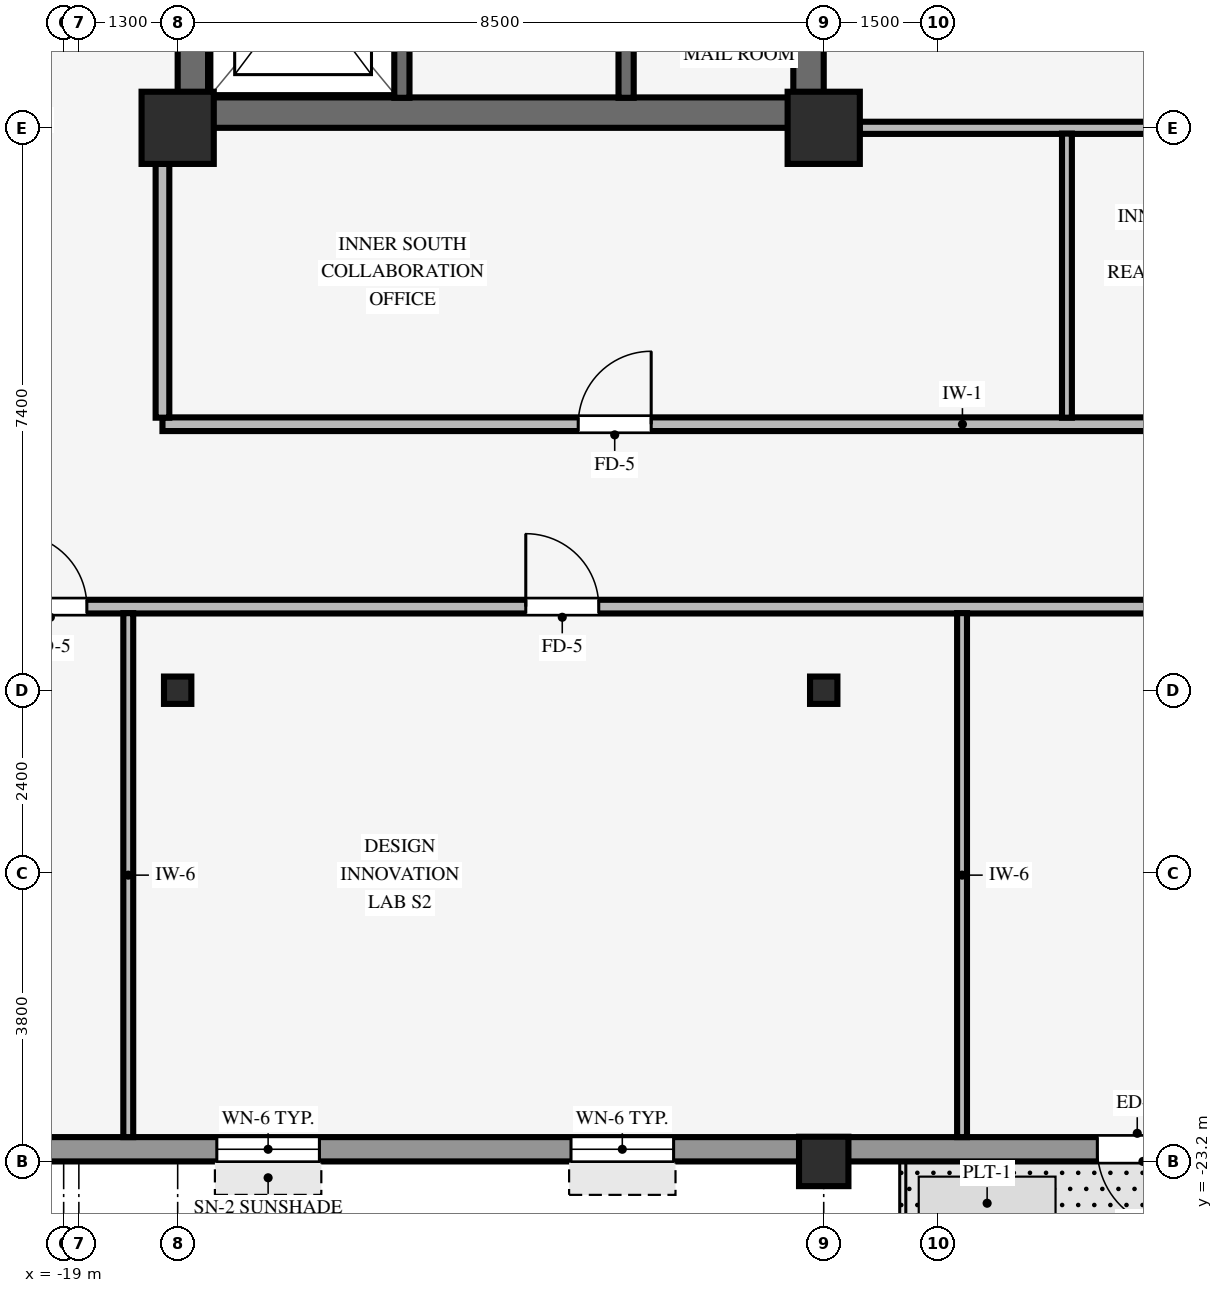
"""IFC4 building model, lengths in metres.
Left out: names, types, materials, properties, quantities, classifications, styles, units other than length and angle.
Written with IfcOpenShell. Run it as: python <this file> out.ifc"""

import sys

from ifc_helpers import new_model, si_unit, direction, frame, frame_2d, origin, origin_2d, place, context, subcontext, project, spatial, rectangle, hollow_rectangle, i_section, extrude, source, transform, mapped, element, fill, save


model = new_model("IFC4")
c1 = context("Model", 3, precision=1e-05, world=origin(), true_north=direction((0.0, 1.0)))
c2 = subcontext(c1, "Body", "Model", "MODEL_VIEW")
j1 = project(units=[si_unit("LENGTHUNIT", "METRE"), si_unit("PLANEANGLEUNIT", "RADIAN")], contexts=[c1])
p1 = place(None, origin())
s1 = spatial("IfcSite", under=j1, at=p1, CompositionType="ELEMENT")
p2 = place(p1, origin())
s2 = spatial("IfcBuilding", under=s1, at=p2, CompositionType="ELEMENT")
p3 = place(p2, frame((0.0, 0.0, 149.4)))
s3 = spatial("IfcBuildingStorey", under=s2, at=p3, CompositionType="ELEMENT", Elevation=149.4)
p4 = place(p3, frame((-17.5, -9.4, 0.0), z_axis=(0.0, 0.0, 1.0), x_axis=(1.0, 0.0, 0.0)))
e1 = element("IfcWall", 1, at=p4, inside=s3, PredefinedType="SHEAR", context=c2, shape_type="SweptSolid", body=[
    extrude(rectangle(XDim=8.5, YDim=0.4, at=frame_2d((4.25, 0.0))), origin(), (0.0, 0.0, 1.0), 3.37),
])
p5 = place(p3, frame((-17.3, -9.205, 0.0), z_axis=(0.0, 0.0, 1.0), x_axis=(0.0, 1.0, 0.0)))
e2 = element("IfcWall", 2, at=p5, inside=s3, PredefinedType="SHEAR", context=c2, shape_type="SweptSolid", body=[
    extrude(rectangle(XDim=18.41, YDim=0.4, at=frame_2d((9.205, 0.0))), origin(), (0.0, 0.0, 1.0), 3.37),
])
p6 = place(p3, frame((-9.2, -9.205, 0.0), z_axis=(0.0, 0.0, 1.0), x_axis=(0.0, 1.0, 0.0)))
e3 = element("IfcWall", 3, at=p6, inside=s3, PredefinedType="SHEAR", context=c2, shape_type="SweptSolid", body=[
    extrude(rectangle(XDim=18.41, YDim=0.4, at=frame_2d((9.205, 0.0))), origin(), (0.0, 0.0, 1.0), 3.37),
])
p7 = place(p6, frame((8.605, 0.0, 0.0)))
e4 = element("IfcOpeningElement", 4, at=p7, cuts=e3, PredefinedType="OPENING", context=c2, shape_type="SweptSolid", body=[
    extrude(rectangle(XDim=1.2, YDim=2.15, at=frame_2d((0.6, 1.075))), frame((0.0, 0.21, 0.0), z_axis=(0.0, -1.0, 0.0), x_axis=(1.0, 0.0, 0.0)), (0.0, 0.0, 1.0), 0.42),
])
for number, where, z_axis, x_axis in (
    (5, (-17.5, -9.6, 0.0), (0.0, 0.0, 1.0), (1.0, 0.0, 0.0)),
    (6, (-9.0, -9.6, 0.0), (0.0, 0.0, 1.0), (1.0, 0.0, 0.0)),
):
    element("IfcColumn", number, at=place(p3, frame(where, z_axis=z_axis, x_axis=x_axis)), inside=s3, PredefinedType="COLUMN", context=c2, shape_type="SweptSolid", body=[
        extrude(rectangle(XDim=0.95, YDim=0.95, at=origin_2d()), origin(), (0.0, 0.0, 1.0), 3.37),
    ])
p8 = place(p3, frame((-9.0, -23.2, 0.0), z_axis=(0.0, 0.0, 1.0), x_axis=(1.0, 0.0, 0.0)))
e7 = element("IfcColumn", 7, at=p8, inside=s3, PredefinedType="COLUMN", context=c2, shape_type="SweptSolid", body=[
    extrude(hollow_rectangle(XDim=0.65, YDim=0.65, WallThickness=0.04, InnerFilletRadius=0.04, OuterFilletRadius=0.08, at=origin_2d()), origin(), (0.0, 0.0, 1.0), 3.37),
])
for number, where, z_axis, x_axis in (
    (8, (-17.5, -17.0, 0.0), (0.0, 0.0, 1.0), (1.0, 0.0, 0.0)),
    (9, (-9.0, -17.0, 0.0), (0.0, 0.0, 1.0), (1.0, 0.0, 0.0)),
):
    element("IfcColumn", number, at=place(p3, frame(where, z_axis=z_axis, x_axis=x_axis)), inside=s3, PredefinedType="COLUMN", context=c2, shape_type="SweptSolid", body=[
        extrude(i_section(OverallWidth=0.36, OverallDepth=0.36, WebThickness=0.021, FlangeThickness=0.021, FilletRadius=0.018, at=origin_2d()), origin(), (0.0, 0.0, 1.0), 3.37),
    ])
p9 = place(p3, frame((-24.3, -23.04, 0.0), z_axis=(0.0, 0.0, 1.0), x_axis=(1.0, 0.0, 0.0)))
e10 = element("IfcWall", 10, at=p9, inside=s3, PredefinedType="STANDARD", context=c2, shape_type="SweptSolid", body=[
    extrude(rectangle(XDim=48.6, YDim=0.32, at=frame_2d((24.3, 0.0))), origin(), (0.0, 0.0, 1.0), 2.705),
])
p10 = place(p9, frame((19.95, 0.0, 0.0), z_axis=(0.0, 0.0, 1.0), x_axis=(-1.0, 0.0, 0.0)))
e11 = element("IfcOpeningElement", 11, at=p10, cuts=e10, PredefinedType="OPENING", context=c2, shape_type="SweptSolid", body=[
    extrude(rectangle(XDim=1.05, YDim=2.1, at=frame_2d((0.525, 1.05))), frame((0.0, 0.17, 0.0), z_axis=(0.0, -1.0, 0.0), x_axis=(1.0, 0.0, 0.0)), (0.0, 0.0, 1.0), 0.34),
])
p11 = place(p9, frame((2.655, 0.0, 0.8)))
e12 = element("IfcOpeningElement", 12, at=p11, cuts=e10, PredefinedType="OPENING", context=c2, shape_type="SweptSolid", body=[
    extrude(rectangle(XDim=1.35, YDim=1.56, at=frame_2d((0.675, 0.78))), frame((0.0, 0.17, 0.0), z_axis=(0.0, -1.0, 0.0), x_axis=(1.0, 0.0, 0.0)), (0.0, 0.0, 1.0), 0.34),
])
p12 = place(p9, frame((7.315, 0.0, 0.8)))
e13 = element("IfcOpeningElement", 13, at=p12, cuts=e10, PredefinedType="OPENING", context=c2, shape_type="SweptSolid", body=[
    extrude(rectangle(XDim=1.35, YDim=1.56, at=frame_2d((0.675, 0.78))), frame((0.0, 0.17, 0.0), z_axis=(0.0, -1.0, 0.0), x_axis=(1.0, 0.0, 0.0)), (0.0, 0.0, 1.0), 0.34),
])
p13 = place(p9, frame((11.975, 0.0, 0.8)))
e14 = element("IfcOpeningElement", 14, at=p13, cuts=e10, PredefinedType="OPENING", context=c2, shape_type="SweptSolid", body=[
    extrude(rectangle(XDim=1.35, YDim=1.56, at=frame_2d((0.675, 0.78))), frame((0.0, 0.17, 0.0), z_axis=(0.0, -1.0, 0.0), x_axis=(1.0, 0.0, 0.0)), (0.0, 0.0, 1.0), 0.34),
])
p14 = place(p9, frame((21.295, 0.0, 0.8)))
e15 = element("IfcOpeningElement", 15, at=p14, cuts=e10, PredefinedType="OPENING", context=c2, shape_type="SweptSolid", body=[
    extrude(rectangle(XDim=1.35, YDim=1.56, at=frame_2d((0.675, 0.78))), frame((0.0, 0.17, 0.0), z_axis=(0.0, -1.0, 0.0), x_axis=(1.0, 0.0, 0.0)), (0.0, 0.0, 1.0), 0.34),
])
p15 = place(p9, frame((25.955, 0.0, 0.8)))
e16 = element("IfcOpeningElement", 16, at=p15, cuts=e10, PredefinedType="OPENING", context=c2, shape_type="SweptSolid", body=[
    extrude(rectangle(XDim=1.35, YDim=1.56, at=frame_2d((0.675, 0.78))), frame((0.0, 0.17, 0.0), z_axis=(0.0, -1.0, 0.0), x_axis=(1.0, 0.0, 0.0)), (0.0, 0.0, 1.0), 0.34),
])
p16 = place(p9, frame((31.065, 0.0, 0.8)))
e17 = element("IfcOpeningElement", 17, at=p16, cuts=e10, PredefinedType="OPENING", context=c2, shape_type="SweptSolid", body=[
    extrude(rectangle(XDim=1.35, YDim=1.56, at=frame_2d((0.675, 0.78))), frame((0.0, 0.17, 0.0), z_axis=(0.0, -1.0, 0.0), x_axis=(1.0, 0.0, 0.0)), (0.0, 0.0, 1.0), 0.34),
])
p17 = place(p9, frame((35.275, 0.0, 0.8)))
e18 = element("IfcOpeningElement", 18, at=p17, cuts=e10, PredefinedType="OPENING", context=c2, shape_type="SweptSolid", body=[
    extrude(rectangle(XDim=1.35, YDim=1.56, at=frame_2d((0.675, 0.78))), frame((0.0, 0.17, 0.0), z_axis=(0.0, -1.0, 0.0), x_axis=(1.0, 0.0, 0.0)), (0.0, 0.0, 1.0), 0.34),
])
p18 = place(p9, frame((39.935, 0.0, 0.8)))
e19 = element("IfcOpeningElement", 19, at=p18, cuts=e10, PredefinedType="OPENING", context=c2, shape_type="SweptSolid", body=[
    extrude(rectangle(XDim=1.35, YDim=1.56, at=frame_2d((0.675, 0.78))), frame((0.0, 0.17, 0.0), z_axis=(0.0, -1.0, 0.0), x_axis=(1.0, 0.0, 0.0)), (0.0, 0.0, 1.0), 0.34),
])
p19 = place(p9, frame((44.595, 0.0, 0.8)))
e20 = element("IfcOpeningElement", 20, at=p19, cuts=e10, PredefinedType="OPENING", context=c2, shape_type="SweptSolid", body=[
    extrude(rectangle(XDim=1.35, YDim=1.56, at=frame_2d((0.675, 0.78))), frame((0.0, 0.17, 0.0), z_axis=(0.0, -1.0, 0.0), x_axis=(1.0, 0.0, 0.0)), (0.0, 0.0, 1.0), 0.34),
])
p20 = place(p3, frame((-14.55, -9.205, 0.0), z_axis=(0.0, 0.0, 1.0), x_axis=(0.0, 1.0, 0.0)))
e21 = element("IfcWall", 21, at=p20, inside=s3, PredefinedType="SHEAR", context=c2, shape_type="SweptSolid", body=[
    extrude(rectangle(XDim=3.01, YDim=0.2, at=frame_2d((1.505, 0.0))), origin(), (0.0, 0.0, 1.0), 3.37),
])
p21 = place(p20, frame((0.93, 0.0, 0.0)))
e22 = element("IfcOpeningElement", 22, at=p21, cuts=e21, PredefinedType="OPENING", context=c2, shape_type="SweptSolid", body=[
    extrude(rectangle(XDim=1.15, YDim=2.15, at=frame_2d((0.575, 1.075))), frame((0.0, 0.11, 0.0), z_axis=(0.0, -1.0, 0.0), x_axis=(1.0, 0.0, 0.0)), (0.0, 0.0, 1.0), 0.22),
])
p22 = place(p3, frame((-11.6, -9.205, 0.0), z_axis=(0.0, 0.0, 1.0), x_axis=(0.0, 1.0, 0.0)))
e23 = element("IfcWall", 23, at=p22, inside=s3, PredefinedType="SHEAR", context=c2, shape_type="SweptSolid", body=[
    extrude(rectangle(XDim=7.975, YDim=0.2, at=frame_2d((3.988, 0.0))), origin(), (0.0, 0.0, 1.0), 3.37),
])
p23 = place(p22, frame((1.265, 0.0, 0.0)))
e24 = element("IfcOpeningElement", 24, at=p23, cuts=e23, PredefinedType="OPENING", context=c2, shape_type="SweptSolid", body=[
    extrude(rectangle(XDim=0.88, YDim=2.1, at=frame_2d((0.44, 1.05))), frame((0.0, 0.11, 0.0), z_axis=(0.0, -1.0, 0.0), x_axis=(1.0, 0.0, 0.0)), (0.0, 0.0, 1.0), 0.22),
])
p24 = place(p22, frame((5.565, 0.0, 0.0)))
e25 = element("IfcOpeningElement", 25, at=p24, cuts=e23, PredefinedType="OPENING", context=c2, shape_type="SweptSolid", body=[
    extrude(rectangle(XDim=0.88, YDim=2.1, at=frame_2d((0.44, 1.05))), frame((0.0, 0.11, 0.0), z_axis=(0.0, -1.0, 0.0), x_axis=(1.0, 0.0, 0.0)), (0.0, 0.0, 1.0), 0.22),
])
p25 = place(p3, frame((-26.08, -15.9, 0.0), z_axis=(0.0, 0.0, 1.0), x_axis=(1.0, 0.0, 0.0)))
e26 = element("IfcWall", 26, at=p25, inside=s3, PredefinedType="PARTITIONING", context=c2, shape_type="SweptSolid", body=[
    extrude(rectangle(XDim=52.16, YDim=0.18, at=frame_2d((26.08, 0.0))), origin(), (0.0, 0.0, 1.0), 3.36),
])
p26 = place(p25, frame((24.5, 0.0, 0.0)))
e27 = element("IfcOpeningElement", 27, at=p26, cuts=e26, PredefinedType="OPENING", context=c2, shape_type="SweptSolid", body=[
    extrude(rectangle(XDim=0.96, YDim=2.1, at=frame_2d((0.48, 1.05))), frame((0.0, 0.1, 0.0), z_axis=(0.0, -1.0, 0.0), x_axis=(1.0, 0.0, 0.0)), (0.0, 0.0, 1.0), 0.2),
])
p27 = place(p25, frame((40.5, 0.0, 0.0)))
e28 = element("IfcOpeningElement", 28, at=p27, cuts=e26, PredefinedType="OPENING", context=c2, shape_type="SweptSolid", body=[
    extrude(rectangle(XDim=0.96, YDim=2.1, at=frame_2d((0.48, 1.05))), frame((0.0, 0.1, 0.0), z_axis=(0.0, -1.0, 0.0), x_axis=(1.0, 0.0, 0.0)), (0.0, 0.0, 1.0), 0.2),
])
p28 = place(p25, frame((13.16, 0.0, 0.0)))
e29 = element("IfcOpeningElement", 29, at=p28, cuts=e26, PredefinedType="OPENING", context=c2, shape_type="SweptSolid", body=[
    extrude(rectangle(XDim=0.96, YDim=2.1, at=frame_2d((0.48, 1.05))), frame((0.0, 0.1, 0.0), z_axis=(0.0, -1.0, 0.0), x_axis=(1.0, 0.0, 0.0)), (0.0, 0.0, 1.0), 0.2),
])
p29 = place(p25, frame((6.425, 0.0, 0.0)))
e30 = element("IfcOpeningElement", 30, at=p29, cuts=e26, PredefinedType="OPENING", context=c2, shape_type="SweptSolid", body=[
    extrude(rectangle(XDim=0.96, YDim=2.1, at=frame_2d((0.48, 1.05))), frame((0.0, 0.1, 0.0), z_axis=(0.0, -1.0, 0.0), x_axis=(1.0, 0.0, 0.0)), (0.0, 0.0, 1.0), 0.2),
])
p30 = place(p3, frame((-17.7, -13.5, 0.0), z_axis=(0.0, 0.0, 1.0), x_axis=(1.0, 0.0, 0.0)))
e31 = element("IfcWall", 31, at=p30, inside=s3, PredefinedType="PARTITIONING", context=c2, shape_type="SweptSolid", body=[
    extrude(rectangle(XDim=24.3, YDim=0.18, at=frame_2d((12.15, 0.0))), origin(), (0.0, 0.0, 1.0), 2.998),
])
p31 = place(p30, frame((5.47, 0.0, 0.0)))
e32 = element("IfcOpeningElement", 32, at=p31, cuts=e31, PredefinedType="OPENING", context=c2, shape_type="SweptSolid", body=[
    extrude(rectangle(XDim=0.96, YDim=2.1, at=frame_2d((0.48, 1.05))), frame((0.0, 0.1, 0.0), z_axis=(0.0, -1.0, 0.0), x_axis=(1.0, 0.0, 0.0)), (0.0, 0.0, 1.0), 0.2),
])
p32 = place(p30, frame((14.62, 0.0, 0.0)))
e33 = element("IfcOpeningElement", 33, at=p32, cuts=e31, PredefinedType="OPENING", context=c2, shape_type="SweptSolid", body=[
    extrude(rectangle(XDim=0.96, YDim=2.1, at=frame_2d((0.48, 1.05))), frame((0.0, 0.1, 0.0), z_axis=(0.0, -1.0, 0.0), x_axis=(1.0, 0.0, 0.0)), (0.0, 0.0, 1.0), 0.2),
])
p33 = place(p30, frame((18.9, 0.0, 0.0)))
e34 = element("IfcOpeningElement", 34, at=p33, cuts=e31, PredefinedType="OPENING", context=c2, shape_type="SweptSolid", body=[
    extrude(rectangle(XDim=0.9, YDim=2.1, at=frame_2d((0.45, 1.05))), frame((0.0, 0.1, 0.0), z_axis=(0.0, -1.0, 0.0), x_axis=(1.0, 0.0, 0.0)), (0.0, 0.0, 1.0), 0.2),
])
p34 = place(p30, frame((21.0, 0.0, 0.0)))
e35 = element("IfcOpeningElement", 35, at=p34, cuts=e31, PredefinedType="OPENING", context=c2, shape_type="SweptSolid", body=[
    extrude(rectangle(XDim=0.9, YDim=2.1, at=frame_2d((0.45, 1.05))), frame((0.0, 0.1, 0.0), z_axis=(0.0, -1.0, 0.0), x_axis=(1.0, 0.0, 0.0)), (0.0, 0.0, 1.0), 0.2),
])
p35 = place(p3, frame((-8.529, -9.6, 0.0), z_axis=(0.0, 0.0, 1.0), x_axis=(1.0, 0.0, 0.0)))
e36 = element("IfcWall", 36, at=p35, inside=s3, PredefinedType="PARTITIONING", context=c2, shape_type="SweptSolid", body=[
    extrude(rectangle(XDim=8.353, YDim=0.16, at=frame_2d((4.177, 0.0))), origin(), (0.0, 0.0, 1.0), 2.405),
])
p36 = place(p3, frame((-18.15, -22.88, 0.0), z_axis=(0.0, 0.0, 1.0), x_axis=(0.0, 1.0, 0.0)))
e37 = element("IfcWall", 37, at=p36, inside=s3, PredefinedType="PARTITIONING", context=c2, shape_type="SweptSolid", body=[
    extrude(rectangle(XDim=6.894, YDim=0.13, at=frame_2d((3.447, 0.0))), origin(), (0.0, 0.0, 1.0), 3.36),
])
p37 = place(p3, frame((-17.7, -13.414, 0.0), z_axis=(0.0, 0.0, 1.0), x_axis=(0.0, 1.0, 0.0)))
e38 = element("IfcWall", 38, at=p37, inside=s3, PredefinedType="PARTITIONING", context=c2, shape_type="SweptSolid", body=[
    extrude(rectangle(XDim=3.343, YDim=0.18, at=frame_2d((1.671, 0.0))), origin(), (0.0, 0.0, 1.0), 2.816),
])
p38 = place(p3, frame((-7.18, -22.88, 0.0), z_axis=(0.0, 0.0, 1.0), x_axis=(0.0, 1.0, 0.0)))
e39 = element("IfcWall", 39, at=p38, inside=s3, PredefinedType="PARTITIONING", context=c2, shape_type="SweptSolid", body=[
    extrude(rectangle(XDim=6.894, YDim=0.13, at=frame_2d((3.447, 0.0))), origin(), (0.0, 0.0, 1.0), 3.36),
])
p39 = place(p3, frame((-5.8, -13.414, 0.0), z_axis=(0.0, 0.0, 1.0), x_axis=(0.0, 1.0, 0.0)))
e40 = element("IfcWall", 40, at=p39, inside=s3, PredefinedType="PARTITIONING", context=c2, shape_type="SweptSolid", body=[
    extrude(rectangle(XDim=3.738, YDim=0.13, at=frame_2d((1.869, 0.0))), origin(), (0.0, 0.0, 1.0), 3.36),
])
m1 = source(origin(), c2, "Body", "SweptSolid", [
    extrude(rectangle(XDim=1.05, YDim=2.1, at=frame_2d((0.525, 1.05))), frame((0.0, 0.025, 0.0), z_axis=(0.0, -1.0, 0.0), x_axis=(1.0, 0.0, 0.0)), (0.0, 0.0, 1.0), 0.05),
])
p40 = place(p10, origin())
e41 = element("IfcDoor", 41, at=p40, inside=s3, OperationType="SINGLE_SWING_LEFT", PredefinedType="DOOR", context=c2, shape_type="MappedRepresentation", body=[
    mapped(m1, transform((0.0, 0.0, 0.0), scale=1.0)),
])
fill(e11, e41)
m2 = source(origin(), c2, "Body", "SweptSolid", [
    extrude(rectangle(XDim=1.35, YDim=1.56, at=frame_2d((0.675, 0.78))), frame((0.0, 0.03, 0.0), z_axis=(0.0, -1.0, 0.0), x_axis=(1.0, 0.0, 0.0)), (0.0, 0.0, 1.0), 0.06),
])
p41 = place(p12, origin())
e42 = element("IfcWindow", 42, at=p41, inside=s3, PartitioningType="SINGLE_PANEL", PredefinedType="WINDOW", context=c2, shape_type="MappedRepresentation", body=[
    mapped(m2, transform((0.0, 0.0, 0.0), scale=1.0)),
])
fill(e13, e42)
p42 = place(p13, origin())
e43 = element("IfcWindow", 43, at=p42, inside=s3, PartitioningType="SINGLE_PANEL", PredefinedType="WINDOW", context=c2, shape_type="MappedRepresentation", body=[
    mapped(m2, transform((0.0, 0.0, 0.0), scale=1.0)),
])
fill(e14, e43)
m3 = source(origin(), c2, "Body", "SweptSolid", [
    extrude(rectangle(XDim=0.96, YDim=2.1, at=frame_2d((0.48, 1.05))), frame((0.0, 0.025, 0.0), z_axis=(0.0, -1.0, 0.0), x_axis=(1.0, 0.0, 0.0)), (0.0, 0.0, 1.0), 0.05),
])
p43 = place(p31, origin())
e44 = element("IfcDoor", 44, at=p43, inside=s3, OperationType="SINGLE_SWING_RIGHT", PredefinedType="DOOR", context=c2, shape_type="MappedRepresentation", body=[
    mapped(m3, transform((0.0, 0.0, 0.0), scale=1.0)),
])
fill(e32, e44)
p44 = place(p28, origin())
e45 = element("IfcDoor", 45, at=p44, inside=s3, OperationType="SINGLE_SWING_LEFT", PredefinedType="DOOR", context=c2, shape_type="MappedRepresentation", body=[
    mapped(m3, transform((0.0, 0.0, 0.0), scale=1.0)),
])
fill(e29, e45)
p45 = place(p29, origin())
e46 = element("IfcDoor", 46, at=p45, inside=s3, OperationType="SINGLE_SWING_LEFT", PredefinedType="DOOR", context=c2, shape_type="MappedRepresentation", body=[
    mapped(m3, transform((0.0, 0.0, 0.0), scale=1.0)),
])
fill(e30, e46)
save(model, sys.argv[1])
